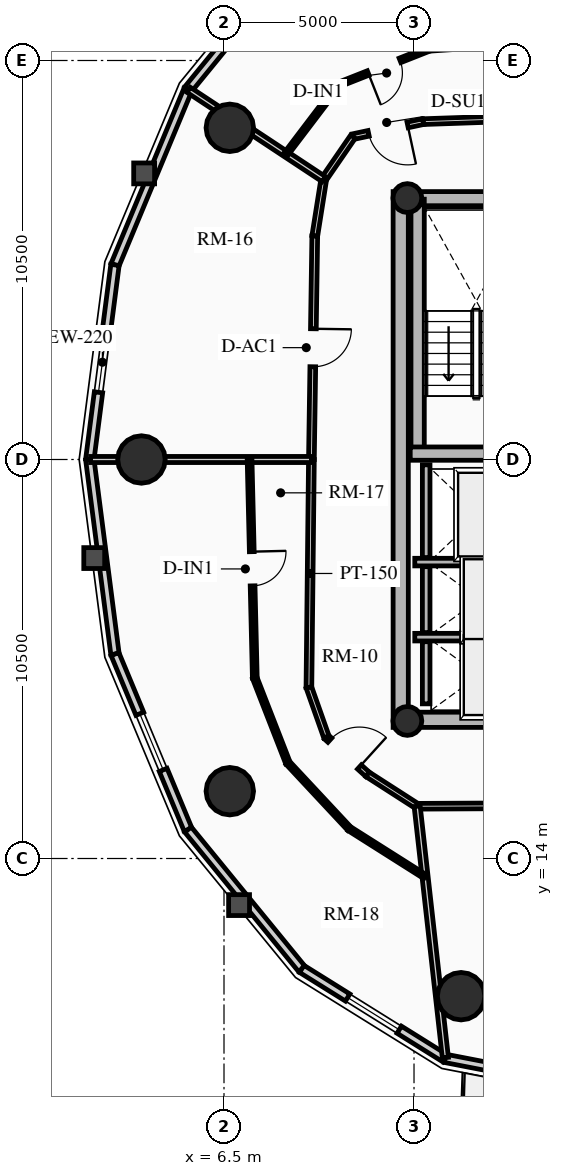
"""IFC4 building model, lengths in metres.
Left out: names, types, materials, properties, quantities, classifications, styles, units other than length and angle.
Written with IfcOpenShell. Run it as: python <this file> out.ifc"""

import sys

from ifc_helpers import new_model, si_unit, direction, frame, frame_2d, origin, origin_2d, place, context, subcontext, project, spatial, rectangle, circle, hollow_circle, extrude, source, transform, mapped, element, fill, save


model = new_model("IFC4")
c1 = context("Model", 3, precision=1e-05, world=origin(), true_north=direction((0.0, 1.0)))
c2 = subcontext(c1, "Body", "Model", "MODEL_VIEW")
j1 = project(units=[si_unit("LENGTHUNIT", "METRE"), si_unit("PLANEANGLEUNIT", "RADIAN")], contexts=[c1])
p1 = place(None, origin())
s1 = spatial("IfcSite", under=j1, at=p1, CompositionType="ELEMENT")
p2 = place(p1, origin())
s2 = spatial("IfcBuilding", under=s1, at=p2, CompositionType="ELEMENT")
p3 = place(p2, frame((0.0, 0.0, 171.97)))
s3 = spatial("IfcBuildingStorey", under=s2, at=p3, CompositionType="ELEMENT", Elevation=171.97)
p4 = place(p3, frame((11.15, 17.45, 0.0), z_axis=(0.0, 0.0, 1.0), x_axis=(0.0, 1.0, 0.0)))
e1 = element("IfcWall", 1, at=p4, inside=s3, PredefinedType="SHEAR", context=c2, shape_type="SweptSolid", body=[
    extrude(rectangle(XDim=14.1, YDim=0.4, at=frame_2d((7.05, 0.0))), origin(), (0.0, 0.0, 1.0), 2.91),
])
p5 = place(p3, frame((11.15, 17.65, 0.0), z_axis=(0.0, 0.0, 1.0), x_axis=(1.0, 0.0, 0.0)))
e2 = element("IfcWall", 2, at=p5, inside=s3, PredefinedType="SHEAR", context=c2, shape_type="SweptSolid", body=[
    extrude(rectangle(XDim=10.7, YDim=0.4, at=frame_2d((5.35, 0.0))), origin(), (0.0, 0.0, 1.0), 2.91),
])
m1 = source(origin(), c2, "Body", "SweptSolid", [
    extrude(rectangle(XDim=1.5, YDim=2.02, at=frame_2d((0.75, 1.01))), frame((0.0, 0.21, 0.0), z_axis=(0.0, -1.0, 0.0), x_axis=(1.0, 0.0, 0.0)), (0.0, 0.0, 1.0), 0.42),
])
p6 = place(p5, frame((5.45, 0.0, 0.0)))
e3 = element("IfcOpeningElement", 3, at=p6, cuts=e2, PredefinedType="OPENING", context=c2, shape_type="MappedRepresentation", body=[
    mapped(m1, transform((0.0, 0.0, 0.0), x_axis=(1.0, 0.0, 0.0), y_axis=(0.0, 1.0, 0.0), z_axis=(0.0, 0.0, 1.0), scale=1.0)),
])
p7 = place(p3, frame((11.15, 31.35, 0.0), z_axis=(0.0, 0.0, 1.0), x_axis=(1.0, 0.0, 0.0)))
e4 = element("IfcWall", 4, at=p7, inside=s3, PredefinedType="SHEAR", context=c2, shape_type="SweptSolid", body=[
    extrude(rectangle(XDim=10.7, YDim=0.4, at=frame_2d((5.35, 0.0))), origin(), (0.0, 0.0, 1.0), 2.91),
])
p8 = place(p7, frame((4.6, 0.0, 0.0)))
e5 = element("IfcOpeningElement", 5, at=p8, cuts=e4, PredefinedType="OPENING", context=c2, shape_type="MappedRepresentation", body=[
    mapped(m1, transform((0.0, 0.0, 0.0), x_axis=(1.0, 0.0, 0.0), y_axis=(0.0, 1.0, 0.0), z_axis=(0.0, 0.0, 1.0), scale=1.0)),
])
p9 = place(p3, frame((11.595, 24.655, 0.0), z_axis=(0.0, 0.0, 1.0), x_axis=(0.0, 1.0, 0.0)))
e6 = element("IfcWall", 6, at=p9, inside=s3, PredefinedType="SHEAR", context=c2, shape_type="SweptSolid", body=[
    extrude(rectangle(XDim=6.695, YDim=0.35, at=frame_2d((3.348, 0.0))), origin(), (0.0, 0.0, 1.0), 2.91),
])
p10 = place(p3, frame((11.4, 24.655, 0.0), z_axis=(0.0, 0.0, 1.0), x_axis=(1.0, 0.0, 0.0)))
e7 = element("IfcWall", 7, at=p10, inside=s3, PredefinedType="SHEAR", context=c2, shape_type="SweptSolid", body=[
    extrude(rectangle(XDim=3.285, YDim=0.35, at=frame_2d((1.643, 0.0))), origin(), (0.0, 0.0, 1.0), 2.91),
])
for number, where, z_axis, x_axis in (
    (8, (11.325, 17.62, 0.0), (0.0, 0.0, 1.0), (1.0, 0.0, 0.0)),
    (9, (11.325, 31.38, 0.0), (0.0, 0.0, 1.0), (1.0, 0.0, 0.0)),
):
    element("IfcColumn", number, at=place(p3, frame(where, z_axis=z_axis, x_axis=x_axis)), inside=s3, PredefinedType="COLUMN", context=c2, shape_type="SweptSolid", body=[
        extrude(hollow_circle(Radius=0.38, WallThickness=0.032, at=origin_2d()), origin(), (0.0, 0.0, 1.0), 2.91),
    ])
for number, where, z_axis, x_axis in (
    (10, (6.653, 33.229, 0.0), (0.0, 0.0, 1.0), (1.0, 0.0, 0.0)),
    (11, (4.328, 24.5, 0.0), (0.0, 0.0, 1.0), (1.0, 0.0, 0.0)),
    (12, (6.653, 15.771, 0.0), (0.0, 0.0, 1.0), (1.0, 0.0, 0.0)),
    (13, (12.739, 10.377, 0.0), (0.0, 0.0, 1.0), (1.0, 0.0, 0.0)),
):
    element("IfcColumn", number, at=place(p3, frame(where, z_axis=z_axis, x_axis=x_axis)), inside=s3, PredefinedType="USERDEFINED", context=c2, shape_type="SweptSolid", body=[
        extrude(circle(Radius=0.625, at=origin_2d()), origin(), (0.0, 0.0, 1.0), 2.91),
    ])
p11 = place(p3, frame((5.553, 34.24, 0.0), z_axis=(0.0, 0.0, 1.0), x_axis=(0.632470615287, 0.774584353572, 0.0)))
e14 = element("IfcWall", 14, at=p11, inside=s3, PredefinedType="SOLIDWALL", context=c2, shape_type="SweptSolid", body=[
    extrude(rectangle(XDim=4.733, YDim=0.22, at=frame_2d((2.366, 0.0))), origin(), (0.0, 0.0, 1.0), 2.245),
])
m2 = source(origin(), c2, "Body", "SweptSolid", [
    extrude(rectangle(XDim=1.6, YDim=1.3, at=frame_2d((0.8, 0.65))), frame((0.0, 0.12, 0.0), z_axis=(0.0, -1.0, 0.0), x_axis=(1.0, 0.0, 0.0)), (0.0, 0.0, 1.0), 0.24),
])
p12 = place(p11, frame((1.566, 0.0, 0.65)))
e15 = element("IfcOpeningElement", 15, at=p12, cuts=e14, PredefinedType="OPENING", context=c2, shape_type="MappedRepresentation", body=[
    mapped(m2, transform((0.0, 0.0, 0.0), x_axis=(1.0, 0.0, 0.0), y_axis=(0.0, 1.0, 0.0), z_axis=(0.0, 0.0, 1.0), scale=1.0)),
])
p13 = place(p3, frame((3.631, 29.62, 0.0), z_axis=(0.0, 0.0, 1.0), x_axis=(0.384144094086, 0.923273152961, 0.0)))
e16 = element("IfcWall", 16, at=p13, inside=s3, PredefinedType="SOLIDWALL", context=c2, shape_type="SweptSolid", body=[
    extrude(rectangle(XDim=5.003, YDim=0.22, at=frame_2d((2.501, 0.0))), origin(), (0.0, 0.0, 1.0), 2.245),
])
p14 = place(p3, frame((2.969, 24.5, 0.0), z_axis=(0.0, 0.0, 1.0), x_axis=(0.128287912609, 0.991736966881, 0.0)))
e17 = element("IfcWall", 17, at=p14, inside=s3, PredefinedType="SOLIDWALL", context=c2, shape_type="SweptSolid", body=[
    extrude(rectangle(XDim=5.163, YDim=0.22, at=frame_2d((2.582, 0.0))), origin(), (0.0, 0.0, 1.0), 2.245),
])
p15 = place(p14, frame((1.782, 0.0, 0.65)))
e18 = element("IfcOpeningElement", 18, at=p15, cuts=e17, PredefinedType="OPENING", context=c2, shape_type="MappedRepresentation", body=[
    mapped(m2, transform((0.0, 0.0, 0.0), x_axis=(1.0, 0.0, 0.0), y_axis=(0.0, 1.0, 0.0), z_axis=(0.0, 0.0, 1.0), scale=1.0)),
])
p16 = place(p3, frame((3.631, 19.38, 0.0), z_axis=(0.0, 0.0, 1.0), x_axis=(-0.128287912609, 0.991736966881, 0.0)))
e19 = element("IfcWall", 19, at=p16, inside=s3, PredefinedType="SOLIDWALL", context=c2, shape_type="SweptSolid", body=[
    extrude(rectangle(XDim=5.163, YDim=0.22, at=frame_2d((2.582, 0.0))), origin(), (0.0, 0.0, 1.0), 2.245),
])
p17 = place(p3, frame((5.553, 14.76, 0.0), z_axis=(0.0, 0.0, 1.0), x_axis=(-0.384144094086, 0.923273152961, 0.0)))
e20 = element("IfcWall", 20, at=p17, inside=s3, PredefinedType="SOLIDWALL", context=c2, shape_type="SweptSolid", body=[
    extrude(rectangle(XDim=5.003, YDim=0.22, at=frame_2d((2.501, 0.0))), origin(), (0.0, 0.0, 1.0), 2.245),
])
p18 = place(p17, frame((1.702, 0.0, 0.65)))
e21 = element("IfcOpeningElement", 21, at=p18, cuts=e20, PredefinedType="OPENING", context=c2, shape_type="MappedRepresentation", body=[
    mapped(m2, transform((0.0, 0.0, 0.0), x_axis=(1.0, 0.0, 0.0), y_axis=(0.0, 1.0, 0.0), z_axis=(0.0, 0.0, 1.0), scale=1.0)),
])
p19 = place(p3, frame((8.547, 11.094, 0.0), z_axis=(0.0, 0.0, 1.0), x_axis=(-0.632470615287, 0.774584353572, 0.0)))
e22 = element("IfcWall", 22, at=p19, inside=s3, PredefinedType="SOLIDWALL", context=c2, shape_type="SweptSolid", body=[
    extrude(rectangle(XDim=4.733, YDim=0.22, at=frame_2d((2.366, 0.0))), origin(), (0.0, 0.0, 1.0), 2.245),
])
p20 = place(p3, frame((12.319, 8.741, 0.0), z_axis=(0.0, 0.0, 1.0), x_axis=(-0.848399108042, 0.529357113368, 0.0)))
e23 = element("IfcWall", 23, at=p20, inside=s3, PredefinedType="SOLIDWALL", context=c2, shape_type="SweptSolid", body=[
    extrude(rectangle(XDim=4.446, YDim=0.22, at=frame_2d((2.223, 0.0))), origin(), (0.0, 0.0, 1.0), 2.245),
])
p21 = place(p20, frame((1.423, 0.0, 0.65)))
e24 = element("IfcOpeningElement", 24, at=p21, cuts=e23, PredefinedType="OPENING", context=c2, shape_type="MappedRepresentation", body=[
    mapped(m2, transform((0.0, 0.0, 0.0), x_axis=(1.0, 0.0, 0.0), y_axis=(0.0, 1.0, 0.0), z_axis=(0.0, 0.0, 1.0), scale=1.0)),
])
p22 = place(p3, frame((16.5, 7.93, 0.0), z_axis=(0.0, 0.0, 1.0), x_axis=(-0.981703883443, 0.190413983815, 0.0)))
e25 = element("IfcWall", 25, at=p22, inside=s3, PredefinedType="SOLIDWALL", context=c2, shape_type="SweptSolid", body=[
    extrude(rectangle(XDim=4.259, YDim=0.22, at=frame_2d((2.13, 0.0))), origin(), (0.0, 0.0, 1.0), 2.245),
])
m3 = source(origin(), c2, "Body", "SweptSolid", [
    extrude(rectangle(XDim=1.15, YDim=2.005, at=frame_2d((0.575, 1.002))), frame((0.0, 0.12, 0.0), z_axis=(0.0, -1.0, 0.0), x_axis=(1.0, 0.0, 0.0)), (0.0, 0.0, 1.0), 0.24),
])
p23 = place(p22, frame((1.555, 0.0, 0.0)))
e26 = element("IfcOpeningElement", 26, at=p23, cuts=e25, PredefinedType="OPENING", context=c2, shape_type="MappedRepresentation", body=[
    mapped(m3, transform((0.0, 0.0, 0.0), x_axis=(1.0, 0.0, 0.0), y_axis=(0.0, 1.0, 0.0), z_axis=(0.0, 0.0, 1.0), scale=1.0)),
])
p24 = place(p3, frame((11.52, 21.8, 0.0), z_axis=(0.0, 0.0, 1.0), x_axis=(1.0, 0.0, 0.0)))
e27 = element("IfcWall", 27, at=p24, inside=s3, PredefinedType="SHEAR", context=c2, shape_type="SweptSolid", body=[
    extrude(rectangle(XDim=2.97, YDim=0.2, at=frame_2d((1.485, 0.0))), origin(), (0.0, 0.0, 1.0), 2.91),
])
p25 = place(p3, frame((11.82, 21.92, 0.0), z_axis=(0.0, 0.0, 1.0), x_axis=(0.0, 1.0, 0.0)))
e28 = element("IfcWall", 28, at=p25, inside=s3, PredefinedType="SHEAR", context=c2, shape_type="SweptSolid", body=[
    extrude(rectangle(XDim=2.44, YDim=0.2, at=frame_2d((1.22, 0.0))), origin(), (0.0, 0.0, 1.0), 2.91),
])
p26 = place(p3, frame((11.52, 19.825, 0.0), z_axis=(0.0, 0.0, 1.0), x_axis=(1.0, 0.0, 0.0)))
e29 = element("IfcWall", 29, at=p26, inside=s3, PredefinedType="SHEAR", context=c2, shape_type="SweptSolid", body=[
    extrude(rectangle(XDim=2.97, YDim=0.2, at=frame_2d((1.485, 0.0))), origin(), (0.0, 0.0, 1.0), 2.91),
])
p27 = place(p3, frame((11.82, 19.945, 0.0), z_axis=(0.0, 0.0, 1.0), x_axis=(0.0, 1.0, 0.0)))
e30 = element("IfcWall", 30, at=p27, inside=s3, PredefinedType="SHEAR", context=c2, shape_type="SweptSolid", body=[
    extrude(rectangle(XDim=1.735, YDim=0.2, at=frame_2d((0.867, 0.0))), origin(), (0.0, 0.0, 1.0), 2.91),
])
p28 = place(p3, frame((11.82, 18.07, 0.0), z_axis=(0.0, 0.0, 1.0), x_axis=(0.0, 1.0, 0.0)))
e31 = element("IfcWall", 31, at=p28, inside=s3, PredefinedType="SHEAR", context=c2, shape_type="SweptSolid", body=[
    extrude(rectangle(XDim=1.635, YDim=0.2, at=frame_2d((0.817, 0.0))), origin(), (0.0, 0.0, 1.0), 2.91),
])
p29 = place(p3, frame((18.102, 33.61, 0.0), z_axis=(0.0, 0.0, 1.0), x_axis=(-0.999410320072, -0.034336746121, 0.0)))
e32 = element("IfcWall", 32, at=p29, inside=s3, PredefinedType="PARTITIONING", context=c2, shape_type="SweptSolid", body=[
    extrude(rectangle(XDim=6.364, YDim=0.15, at=frame_2d((3.182, 0.0))), origin(), (0.0, 0.0, 1.0), 2.245),
])
p30 = place(p3, frame((11.742, 33.391, 0.0), z_axis=(0.0, 0.0, 1.0), x_axis=(-0.977853431612, -0.209290865268, 0.0)))
e33 = element("IfcWall", 33, at=p30, inside=s3, PredefinedType="PARTITIONING", context=c2, shape_type="SweptSolid", body=[
    extrude(rectangle(XDim=1.89, YDim=0.15, at=frame_2d((0.945, 0.0))), origin(), (0.0, 0.0, 1.0), 2.245),
])
m4 = source(origin(), c2, "Body", "SweptSolid", [
    extrude(rectangle(XDim=1.05, YDim=2.015, at=frame_2d((0.525, 1.007))), frame((0.0, 0.085, 0.0), z_axis=(0.0, -1.0, 0.0), x_axis=(1.0, 0.0, 0.0)), (0.0, 0.0, 1.0), 0.17),
])
p31 = place(p30, frame((0.42, 0.0, 0.0)))
e34 = element("IfcOpeningElement", 34, at=p31, cuts=e33, PredefinedType="OPENING", context=c2, shape_type="MappedRepresentation", body=[
    mapped(m4, transform((0.0, 0.0, 0.0), x_axis=(1.0, 0.0, 0.0), y_axis=(0.0, 1.0, 0.0), z_axis=(0.0, 0.0, 1.0), scale=1.0)),
])
p32 = place(p3, frame((9.894, 32.996, 0.0), z_axis=(0.0, 0.0, 1.0), x_axis=(-0.566521185207, -0.824047175052, 0.0)))
e35 = element("IfcWall", 35, at=p32, inside=s3, PredefinedType="PARTITIONING", context=c2, shape_type="SweptSolid", body=[
    extrude(rectangle(XDim=1.357, YDim=0.15, at=frame_2d((0.678, 0.0))), origin(), (0.0, 0.0, 1.0), 2.245),
])
p33 = place(p3, frame((9.126, 31.878, 0.0), z_axis=(0.0, 0.0, 1.0), x_axis=(-0.156632813117, -0.98765690493, 0.0)))
e36 = element("IfcWall", 36, at=p33, inside=s3, PredefinedType="PARTITIONING", context=c2, shape_type="SweptSolid", body=[
    extrude(rectangle(XDim=1.515, YDim=0.15, at=frame_2d((0.758, 0.0))), origin(), (0.0, 0.0, 1.0), 2.245),
])
p34 = place(p3, frame((8.888, 30.381, 0.0), z_axis=(0.0, 0.0, 1.0), x_axis=(-0.015025285815, -0.999887114021, 0.0)))
e37 = element("IfcWall", 37, at=p34, inside=s3, PredefinedType="PARTITIONING", context=c2, shape_type="SweptSolid", body=[
    extrude(rectangle(XDim=5.882, YDim=0.15, at=frame_2d((2.941, 0.0))), origin(), (0.0, 0.0, 1.0), 2.675),
])
m5 = source(origin(), c2, "Body", "SweptSolid", [
    extrude(rectangle(XDim=1.0, YDim=2.015, at=frame_2d((0.5, 1.007))), frame((0.0, 0.085, 0.0), z_axis=(0.0, -1.0, 0.0), x_axis=(1.0, 0.0, 0.0)), (0.0, 0.0, 1.0), 0.17),
])
p35 = place(p34, frame((2.441, 0.0, 0.0)))
e38 = element("IfcOpeningElement", 38, at=p35, cuts=e37, PredefinedType="OPENING", context=c2, shape_type="MappedRepresentation", body=[
    mapped(m5, transform((0.0, 0.0, 0.0), x_axis=(1.0, 0.0, 0.0), y_axis=(0.0, 1.0, 0.0), z_axis=(0.0, 0.0, 1.0), scale=1.0)),
])
p36 = place(p3, frame((8.8, 24.5, 0.0), z_axis=(0.0, 0.0, 1.0), x_axis=(-0.011028591374, -0.999939183237, 0.0)))
e39 = element("IfcWall", 39, at=p36, inside=s3, PredefinedType="PARTITIONING", context=c2, shape_type="SweptSolid", body=[
    extrude(rectangle(XDim=5.999, YDim=0.15, at=frame_2d((3.0, 0.0))), origin(), (0.0, 0.0, 1.0), 2.245),
])
p37 = place(p3, frame((8.734, 18.501, 0.0), z_axis=(0.0, 0.0, 1.0), x_axis=(0.333612366873, -0.94271034187, 0.0)))
e40 = element("IfcWall", 40, at=p37, inside=s3, PredefinedType="PARTITIONING", context=c2, shape_type="SweptSolid", body=[
    extrude(rectangle(XDim=1.386, YDim=0.15, at=frame_2d((0.693, 0.0))), origin(), (0.0, 0.0, 1.0), 2.245),
])
p38 = place(p3, frame((9.196, 17.195, 0.0), z_axis=(0.0, 0.0, 1.0), x_axis=(0.740734525483, -0.671797858553, 0.0)))
e41 = element("IfcWall", 41, at=p38, inside=s3, PredefinedType="PARTITIONING", context=c2, shape_type="SweptSolid", body=[
    extrude(rectangle(XDim=1.459, YDim=0.15, at=frame_2d((0.729, 0.0))), origin(), (0.0, 0.0, 1.0), 2.245),
])
p39 = place(p38, frame((0.12, 0.0, 0.0)))
e42 = element("IfcOpeningElement", 42, at=p39, cuts=e41, PredefinedType="OPENING", context=c2, shape_type="MappedRepresentation", body=[
    mapped(m4, transform((0.0, 0.0, 0.0), x_axis=(1.0, 0.0, 0.0), y_axis=(0.0, 1.0, 0.0), z_axis=(0.0, 0.0, 1.0), scale=1.0)),
])
p40 = place(p3, frame((10.277, 16.214, 0.0), z_axis=(0.0, 0.0, 1.0), x_axis=(0.841060909507, -0.540940427865, 0.0)))
e43 = element("IfcWall", 43, at=p40, inside=s3, PredefinedType="PARTITIONING", context=c2, shape_type="SweptSolid", body=[
    extrude(rectangle(XDim=1.552, YDim=0.15, at=frame_2d((0.776, 0.0))), origin(), (0.0, 0.0, 1.0), 2.245),
])
p41 = place(p3, frame((11.583, 15.375, 0.0), z_axis=(0.0, 0.0, 1.0), x_axis=(0.999988014548, 0.004895994347, 0.0)))
e44 = element("IfcWall", 44, at=p41, inside=s3, PredefinedType="PARTITIONING", context=c2, shape_type="SweptSolid", body=[
    extrude(rectangle(XDim=3.241, YDim=0.15, at=frame_2d((1.621, 0.0))), origin(), (0.0, 0.0, 1.0), 2.245),
])
p42 = place(p3, frame((9.126, 31.878, 0.0), z_axis=(0.0, 0.0, 1.0), x_axis=(-0.834299098788, 0.551312083815, 0.0)))
e45 = element("IfcWall", 45, at=p42, inside=s3, PredefinedType="PARTITIONING", context=c2, shape_type="SweptSolid", body=[
    extrude(rectangle(XDim=4.263, YDim=0.16, at=frame_2d((2.131, 0.0))), origin(), (0.0, 0.0, 1.0), 2.245),
])
p43 = place(p3, frame((8.8, 24.5, 0.0), z_axis=(0.0, 0.0, 1.0), x_axis=(-1.0, 0.0, 0.0)))
e46 = element("IfcWall", 46, at=p43, inside=s3, PredefinedType="PARTITIONING", context=c2, shape_type="SweptSolid", body=[
    extrude(rectangle(XDim=5.811, YDim=0.16, at=frame_2d((2.906, 0.0))), origin(), (0.0, 0.0, 1.0), 2.245),
])
p44 = place(p3, frame((11.583, 15.375, 0.0), z_axis=(0.0, 0.0, 1.0), x_axis=(0.111538514066, -0.993760111838, 0.0)))
e47 = element("IfcWall", 47, at=p44, inside=s3, PredefinedType="PARTITIONING", context=c2, shape_type="SweptSolid", body=[
    extrude(rectangle(XDim=6.656, YDim=0.16, at=frame_2d((3.328, 0.0))), origin(), (0.0, 0.0, 1.0), 2.245),
])
p45 = place(p3, frame((11.906, 35.309, 0.0), z_axis=(0.0, 0.0, 1.0), x_axis=(-0.930011423211, -0.367530614639, 0.0)))
e48 = element("IfcWall", 48, at=p45, inside=s3, PredefinedType="PARTITIONING", context=c2, shape_type="SweptSolid", body=[
    extrude(rectangle(XDim=2.565, YDim=0.125, at=frame_2d((1.282, 0.0))), origin(), (0.0, 0.0, 1.0), 2.245),
])
m6 = source(origin(), c2, "Body", "SweptSolid", [
    extrude(rectangle(XDim=0.9, YDim=2.005, at=frame_2d((0.45, 1.002))), frame((0.0, 0.073, 0.0), z_axis=(0.0, -1.0, 0.0), x_axis=(1.0, 0.0, 0.0)), (0.0, 0.0, 1.0), 0.145),
])
p46 = place(p45, frame((0.832, 0.0, 0.0)))
e49 = element("IfcOpeningElement", 49, at=p46, cuts=e48, PredefinedType="OPENING", context=c2, shape_type="MappedRepresentation", body=[
    mapped(m6, transform((0.0, 0.0, 0.0), x_axis=(1.0, 0.0, 0.0), y_axis=(0.0, 1.0, 0.0), z_axis=(0.0, 0.0, 1.0), scale=1.0)),
])
p47 = place(p3, frame((9.52, 34.366, 0.0), z_axis=(0.0, 0.0, 1.0), x_axis=(-0.604900120492, -0.796301352648, 0.0)))
e50 = element("IfcWall", 50, at=p47, inside=s3, PredefinedType="PARTITIONING", context=c2, shape_type="SweptSolid", body=[
    extrude(rectangle(XDim=2.299, YDim=0.125, at=frame_2d((1.149, 0.0))), origin(), (0.0, 0.0, 1.0), 2.245),
])
p48 = place(p3, frame((7.173, 24.5, 0.0), z_axis=(0.0, 0.0, 1.0), x_axis=(0.023936084601, -0.999713490883, 0.0)))
e51 = element("IfcWall", 51, at=p48, inside=s3, PredefinedType="PARTITIONING", context=c2, shape_type="SweptSolid", body=[
    extrude(rectangle(XDim=5.753, YDim=0.125, at=frame_2d((2.876, 0.0))), origin(), (0.0, 0.0, 1.0), 2.245),
])
p49 = place(p48, frame((2.426, 0.0, 0.0)))
e52 = element("IfcOpeningElement", 52, at=p49, cuts=e51, PredefinedType="OPENING", context=c2, shape_type="MappedRepresentation", body=[
    mapped(m6, transform((0.0, 0.0, 0.0), x_axis=(1.0, 0.0, 0.0), y_axis=(0.0, 1.0, 0.0), z_axis=(0.0, 0.0, 1.0), scale=1.0)),
])
p50 = place(p3, frame((7.311, 18.749, 0.0), z_axis=(0.0, 0.0, 1.0), x_axis=(0.363119757726, -0.931742475982, 0.0)))
e53 = element("IfcWall", 53, at=p50, inside=s3, PredefinedType="PARTITIONING", context=c2, shape_type="SweptSolid", body=[
    extrude(rectangle(XDim=2.396, YDim=0.125, at=frame_2d((1.198, 0.0))), origin(), (0.0, 0.0, 1.0), 2.245),
])
p51 = place(p3, frame((8.181, 16.516, 0.0), z_axis=(0.0, 0.0, 1.0), x_axis=(0.682244764422, -0.731123848209, 0.0)))
e54 = element("IfcWall", 54, at=p51, inside=s3, PredefinedType="PARTITIONING", context=c2, shape_type="SweptSolid", body=[
    extrude(rectangle(XDim=2.367, YDim=0.125, at=frame_2d((1.184, 0.0))), origin(), (0.0, 0.0, 1.0), 2.245),
])
p52 = place(p3, frame((9.796, 14.785, 0.0), z_axis=(0.0, 0.0, 1.0), x_axis=(0.844898543763, -0.534926584446, 0.0)))
e55 = element("IfcWall", 55, at=p52, inside=s3, PredefinedType="PARTITIONING", context=c2, shape_type="SweptSolid", body=[
    extrude(rectangle(XDim=2.361, YDim=0.125, at=frame_2d((1.18, 0.0))), origin(), (0.0, 0.0, 1.0), 2.245),
])
m7 = source(origin(), c2, "Body", "SweptSolid", [
    extrude(rectangle(XDim=1.6, YDim=1.3, at=frame_2d((0.8, 0.65))), frame((0.0, 0.03, 0.0), z_axis=(0.0, -1.0, 0.0), x_axis=(1.0, 0.0, 0.0)), (0.0, 0.0, 1.0), 0.06),
])
p53 = place(p15, origin())
e56 = element("IfcWindow", 56, at=p53, inside=s3, PartitioningType="SINGLE_PANEL", PredefinedType="WINDOW", context=c2, shape_type="MappedRepresentation", body=[
    mapped(m7, transform((0.0, 0.0, 0.0), x_axis=(1.0, 0.0, 0.0), y_axis=(0.0, 1.0, 0.0), z_axis=(0.0, 0.0, 1.0), scale=1.0)),
])
fill(e18, e56)
p54 = place(p18, origin())
e57 = element("IfcWindow", 57, at=p54, inside=s3, PartitioningType="SINGLE_PANEL", PredefinedType="WINDOW", context=c2, shape_type="MappedRepresentation", body=[
    mapped(m7, transform((0.0, 0.0, 0.0), x_axis=(1.0, 0.0, 0.0), y_axis=(0.0, 1.0, 0.0), z_axis=(0.0, 0.0, 1.0), scale=1.0)),
])
fill(e21, e57)
p55 = place(p21, origin())
e58 = element("IfcWindow", 58, at=p55, inside=s3, PartitioningType="SINGLE_PANEL", PredefinedType="WINDOW", context=c2, shape_type="MappedRepresentation", body=[
    mapped(m7, transform((0.0, 0.0, 0.0), x_axis=(1.0, 0.0, 0.0), y_axis=(0.0, 1.0, 0.0), z_axis=(0.0, 0.0, 1.0), scale=1.0)),
])
fill(e24, e58)
m8 = source(origin(), c2, "Body", "SweptSolid", [
    extrude(rectangle(XDim=1.05, YDim=2.015, at=frame_2d((0.525, 1.007))), frame((0.0, 0.025, 0.0), z_axis=(0.0, -1.0, 0.0), x_axis=(1.0, 0.0, 0.0)), (0.0, 0.0, 1.0), 0.05),
])
p56 = place(p31, origin())
e59 = element("IfcDoor", 59, at=p56, inside=s3, OperationType="SINGLE_SWING_LEFT", PredefinedType="DOOR", context=c2, shape_type="MappedRepresentation", body=[
    mapped(m8, transform((0.0, 0.0, 0.0), x_axis=(1.0, 0.0, 0.0), y_axis=(0.0, 1.0, 0.0), z_axis=(0.0, 0.0, 1.0), scale=1.0)),
])
fill(e34, e59)
m9 = source(origin(), c2, "Body", "SweptSolid", [
    extrude(rectangle(XDim=0.9, YDim=2.005, at=frame_2d((0.45, 1.002))), frame((0.0, 0.025, 0.0), z_axis=(0.0, -1.0, 0.0), x_axis=(1.0, 0.0, 0.0)), (0.0, 0.0, 1.0), 0.05),
])
p57 = place(p46, origin())
e60 = element("IfcDoor", 60, at=p57, inside=s3, OperationType="SINGLE_SWING_RIGHT", PredefinedType="DOOR", context=c2, shape_type="MappedRepresentation", body=[
    mapped(m9, transform((0.0, 0.0, 0.0), x_axis=(1.0, 0.0, 0.0), y_axis=(0.0, 1.0, 0.0), z_axis=(0.0, 0.0, 1.0), scale=1.0)),
])
fill(e49, e60)
m10 = source(origin(), c2, "Body", "SweptSolid", [
    extrude(rectangle(XDim=1.0, YDim=2.015, at=frame_2d((0.5, 1.007))), frame((0.0, 0.025, 0.0), z_axis=(0.0, -1.0, 0.0), x_axis=(1.0, 0.0, 0.0)), (0.0, 0.0, 1.0), 0.05),
])
p58 = place(p35, origin())
e61 = element("IfcDoor", 61, at=p58, inside=s3, OperationType="SINGLE_SWING_LEFT", PredefinedType="DOOR", context=c2, shape_type="MappedRepresentation", body=[
    mapped(m10, transform((0.0, 0.0, 0.0), x_axis=(1.0, 0.0, 0.0), y_axis=(0.0, 1.0, 0.0), z_axis=(0.0, 0.0, 1.0), scale=1.0)),
])
fill(e38, e61)
p59 = place(p39, origin())
e62 = element("IfcDoor", 62, at=p59, inside=s3, OperationType="SINGLE_SWING_RIGHT", PredefinedType="DOOR", context=c2, shape_type="MappedRepresentation", body=[
    mapped(m8, transform((0.0, 0.0, 0.0), x_axis=(1.0, 0.0, 0.0), y_axis=(0.0, 1.0, 0.0), z_axis=(0.0, 0.0, 1.0), scale=1.0)),
])
fill(e42, e62)
p60 = place(p49, origin())
e63 = element("IfcDoor", 63, at=p60, inside=s3, OperationType="SINGLE_SWING_LEFT", PredefinedType="DOOR", context=c2, shape_type="MappedRepresentation", body=[
    mapped(m9, transform((0.0, 0.0, 0.0), x_axis=(1.0, 0.0, 0.0), y_axis=(0.0, 1.0, 0.0), z_axis=(0.0, 0.0, 1.0), scale=1.0)),
])
fill(e52, e63)
save(model, sys.argv[1])
